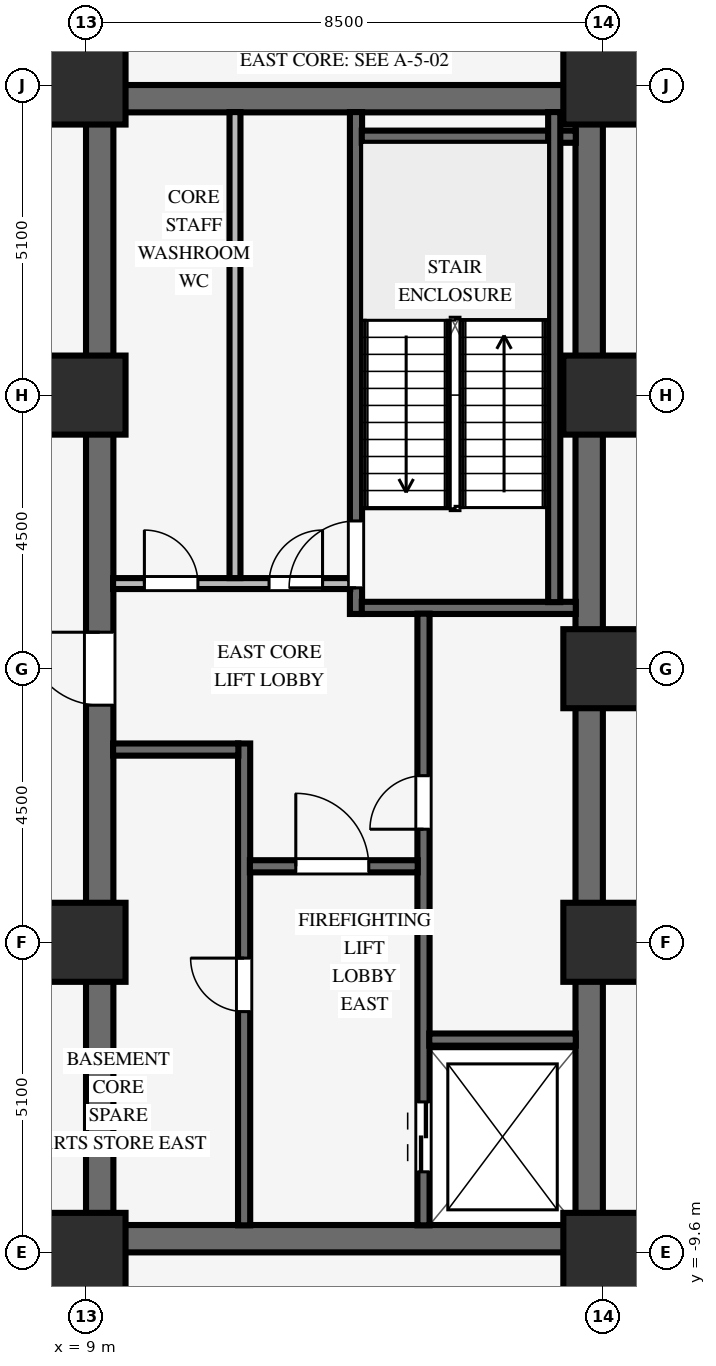
"""IFC4 building model, lengths in metres.
Left out: names, types, materials, properties, quantities, classifications, styles, units other than length and angle.
Written with IfcOpenShell. Run it as: python <this file> out.ifc"""

import sys

from ifc_helpers import new_model, si_unit, direction, frame, frame_2d, origin, origin_2d, place, context, subcontext, project, spatial, rectangle, extrude, source, transform, mapped, element, fill, save


model = new_model("IFC4")
c1 = context("Model", 3, precision=1e-05, world=origin(), true_north=direction((0.0, 1.0)))
c2 = subcontext(c1, "Body", "Model", "MODEL_VIEW")
j1 = project(units=[si_unit("LENGTHUNIT", "METRE"), si_unit("PLANEANGLEUNIT", "RADIAN")], contexts=[c1])
p1 = place(None, origin())
s1 = spatial("IfcSite", under=j1, at=p1, CompositionType="ELEMENT")
p2 = place(p1, origin())
s2 = spatial("IfcBuilding", under=s1, at=p2, CompositionType="ELEMENT")
p3 = place(p2, frame((0.0, 0.0, -4.2)))
s3 = spatial("IfcBuildingStorey", under=s2, at=p3, CompositionType="ELEMENT", Elevation=-4.2)
for number, where, z_axis, x_axis in (
    (1, (9.0, -9.375, 0.0), (0.0, 0.0, 1.0), (1.0, 0.0, 0.0)),
    (2, (9.0, 9.375, 0.0), (0.0, 0.0, 1.0), (1.0, 0.0, 0.0)),
):
    element("IfcWall", number, at=place(p3, frame(where, z_axis=z_axis, x_axis=x_axis)), inside=s3, PredefinedType="SHEAR", context=c2, shape_type="SweptSolid", body=[
        extrude(rectangle(XDim=8.5, YDim=0.45, at=frame_2d((4.25, 0.0))), origin(), (0.0, 0.0, 1.0), 3.88),
    ])
p4 = place(p3, frame((9.225, -9.155, 0.0), z_axis=(0.0, 0.0, 1.0), x_axis=(0.0, 1.0, 0.0)))
e3 = element("IfcWall", 3, at=p4, inside=s3, PredefinedType="SHEAR", context=c2, shape_type="SweptSolid", body=[
    extrude(rectangle(XDim=18.31, YDim=0.45, at=frame_2d((9.155, 0.0))), origin(), (0.0, 0.0, 1.0), 3.88),
])
p5 = place(p4, frame((8.555, 0.0, 0.0)))
e4 = element("IfcOpeningElement", 4, at=p5, cuts=e3, PredefinedType="OPENING", context=c2, shape_type="SweptSolid", body=[
    extrude(rectangle(XDim=1.2, YDim=2.15, at=frame_2d((0.6, 1.075))), frame((0.0, 0.235, 0.0), z_axis=(0.0, -1.0, 0.0), x_axis=(1.0, 0.0, 0.0)), (0.0, 0.0, 1.0), 0.47),
])
p6 = place(p3, frame((17.275, -9.155, 0.0), z_axis=(0.0, 0.0, 1.0), x_axis=(0.0, 1.0, 0.0)))
e5 = element("IfcWall", 5, at=p6, inside=s3, PredefinedType="SHEAR", context=c2, shape_type="SweptSolid", body=[
    extrude(rectangle(XDim=18.31, YDim=0.45, at=frame_2d((9.155, 0.0))), origin(), (0.0, 0.0, 1.0), 3.88),
])
for number, where, z_axis, x_axis in (
    (6, (9.0, -9.6, 0.0), (0.0, 0.0, 1.0), (1.0, 0.0, 0.0)),
    (7, (9.0, -4.5, 0.0), (0.0, 0.0, 1.0), (1.0, 0.0, 0.0)),
    (8, (9.0, 4.5, 0.0), (0.0, 0.0, 1.0), (1.0, 0.0, 0.0)),
    (9, (9.0, 9.6, 0.0), (0.0, 0.0, 1.0), (1.0, 0.0, 0.0)),
    (10, (17.5, -9.6, 0.0), (0.0, 0.0, 1.0), (1.0, 0.0, 0.0)),
    (11, (17.5, -4.5, 0.0), (0.0, 0.0, 1.0), (1.0, 0.0, 0.0)),
    (12, (17.5, 4.5, 0.0), (0.0, 0.0, 1.0), (1.0, 0.0, 0.0)),
    (13, (17.5, 9.6, 0.0), (0.0, 0.0, 1.0), (1.0, 0.0, 0.0)),
    (14, (17.5, 0.0, 0.0), (0.0, 0.0, 1.0), (1.0, 0.0, 0.0)),
):
    element("IfcColumn", number, at=place(p3, frame(where, z_axis=z_axis, x_axis=x_axis)), inside=s3, PredefinedType="COLUMN", context=c2, shape_type="SweptSolid", body=[
        extrude(rectangle(XDim=1.3, YDim=1.3, at=origin_2d()), origin(), (0.0, 0.0, 1.0), 3.88),
    ])
p7 = place(p3, frame((13.44, 0.9, 0.0), z_axis=(0.0, 0.0, 1.0), x_axis=(0.0, 1.0, 0.0)))
e15 = element("IfcWall", 15, at=p7, inside=s3, PredefinedType="SHEAR", context=c2, shape_type="SweptSolid", body=[
    extrude(rectangle(XDim=8.255, YDim=0.2, at=frame_2d((4.127, 0.0))), origin(), (0.0, 0.0, 1.0), 3.88),
])
p8 = place(p7, frame((0.43, 0.0, 0.0)))
e16 = element("IfcOpeningElement", 16, at=p8, cuts=e15, PredefinedType="OPENING", context=c2, shape_type="SweptSolid", body=[
    extrude(rectangle(XDim=1.1, YDim=2.15, at=frame_2d((0.55, 1.075))), frame((0.0, 0.11, 0.0), z_axis=(0.0, -1.0, 0.0), x_axis=(1.0, 0.0, 0.0)), (0.0, 0.0, 1.0), 0.22),
])
for number, where, z_axis, x_axis in (
    (17, (13.535, 1.0, 0.0), (0.0, 0.0, 1.0), (1.0, 0.0, 0.0)),
    (18, (13.535, 8.75, 0.0), (0.0, 0.0, 1.0), (1.0, 0.0, 0.0)),
):
    element("IfcWall", number, at=place(p3, frame(where, z_axis=z_axis, x_axis=x_axis)), inside=s3, PredefinedType="SHEAR", context=c2, shape_type="SweptSolid", body=[
        extrude(rectangle(XDim=3.52, YDim=0.2, at=frame_2d((1.76, 0.0))), origin(), (0.0, 0.0, 1.0), 3.88),
    ])
p9 = place(p3, frame((16.7, 1.095, 0.0), z_axis=(0.0, 0.0, 1.0), x_axis=(0.0, 1.0, 0.0)))
e19 = element("IfcWall", 19, at=p9, inside=s3, PredefinedType="SHEAR", context=c2, shape_type="SweptSolid", body=[
    extrude(rectangle(XDim=8.06, YDim=0.2, at=frame_2d((4.03, 0.0))), origin(), (0.0, 0.0, 1.0), 3.88),
])
p10 = place(p3, frame((14.55, -9.155, 0.0), z_axis=(0.0, 0.0, 1.0), x_axis=(0.0, 1.0, 0.0)))
e20 = element("IfcWall", 20, at=p10, inside=s3, PredefinedType="SHEAR", context=c2, shape_type="SweptSolid", body=[
    extrude(rectangle(XDim=10.06, YDim=0.2, at=frame_2d((5.03, 0.0))), origin(), (0.0, 0.0, 1.0), 3.88),
])
p11 = place(p10, frame((6.515, 0.0, 0.0)))
e21 = element("IfcOpeningElement", 21, at=p11, cuts=e20, PredefinedType="OPENING", context=c2, shape_type="SweptSolid", body=[
    extrude(rectangle(XDim=0.88, YDim=2.1, at=frame_2d((0.44, 1.05))), frame((0.0, 0.11, 0.0), z_axis=(0.0, -1.0, 0.0), x_axis=(1.0, 0.0, 0.0)), (0.0, 0.0, 1.0), 0.22),
])
p12 = place(p10, frame((0.88, 0.0, 0.0)))
e22 = element("IfcOpeningElement", 22, at=p12, cuts=e20, PredefinedType="OPENING", context=c2, shape_type="SweptSolid", body=[
    extrude(rectangle(XDim=1.15, YDim=2.15, at=frame_2d((0.575, 1.075))), frame((0.0, 0.11, 0.0), z_axis=(0.0, -1.0, 0.0), x_axis=(1.0, 0.0, 0.0)), (0.0, 0.0, 1.0), 0.22),
])
p13 = place(p3, frame((14.645, -6.1, 0.0), z_axis=(0.0, 0.0, 1.0), x_axis=(1.0, 0.0, 0.0)))
e23 = element("IfcWall", 23, at=p13, inside=s3, PredefinedType="SHEAR", context=c2, shape_type="SweptSolid", body=[
    extrude(rectangle(XDim=2.41, YDim=0.2, at=frame_2d((1.205, 0.0))), origin(), (0.0, 0.0, 1.0), 3.88),
])
p14 = place(p3, frame((11.6, -9.155, 0.0), z_axis=(0.0, 0.0, 1.0), x_axis=(0.0, 1.0, 0.0)))
e24 = element("IfcWall", 24, at=p14, inside=s3, PredefinedType="SHEAR", context=c2, shape_type="SweptSolid", body=[
    extrude(rectangle(XDim=7.925, YDim=0.2, at=frame_2d((3.962, 0.0))), origin(), (0.0, 0.0, 1.0), 3.88),
])
p15 = place(p14, frame((3.515, 0.0, 0.0)))
e25 = element("IfcOpeningElement", 25, at=p15, cuts=e24, PredefinedType="OPENING", context=c2, shape_type="SweptSolid", body=[
    extrude(rectangle(XDim=0.88, YDim=2.1, at=frame_2d((0.44, 1.05))), frame((0.0, 0.11, 0.0), z_axis=(0.0, -1.0, 0.0), x_axis=(1.0, 0.0, 0.0)), (0.0, 0.0, 1.0), 0.22),
])
p16 = place(p3, frame((11.695, -3.25, 0.0), z_axis=(0.0, 0.0, 1.0), x_axis=(1.0, 0.0, 0.0)))
e26 = element("IfcWall", 26, at=p16, inside=s3, PredefinedType="SHEAR", context=c2, shape_type="SweptSolid", body=[
    extrude(rectangle(XDim=2.76, YDim=0.2, at=frame_2d((1.38, 0.0))), origin(), (0.0, 0.0, 1.0), 3.88),
])
p17 = place(p16, frame((0.755, 0.0, 0.0)))
e27 = element("IfcOpeningElement", 27, at=p17, cuts=e26, PredefinedType="OPENING", context=c2, shape_type="SweptSolid", body=[
    extrude(rectangle(XDim=1.2, YDim=2.15, at=frame_2d((0.6, 1.075))), frame((0.0, 0.11, 0.0), z_axis=(0.0, -1.0, 0.0), x_axis=(1.0, 0.0, 0.0)), (0.0, 0.0, 1.0), 0.22),
])
p18 = place(p3, frame((9.445, -1.33, 0.0), z_axis=(0.0, 0.0, 1.0), x_axis=(1.0, 0.0, 0.0)))
e28 = element("IfcWall", 28, at=p18, inside=s3, PredefinedType="SHEAR", context=c2, shape_type="SweptSolid", body=[
    extrude(rectangle(XDim=2.06, YDim=0.2, at=frame_2d((1.03, 0.0))), origin(), (0.0, 0.0, 1.0), 3.88),
])
p19 = place(p3, frame((9.445, 1.4, 0.0), z_axis=(0.0, 0.0, 1.0), x_axis=(1.0, 0.0, 0.0)))
e29 = element("IfcWall", 29, at=p19, inside=s3, PredefinedType="PARTITIONING", context=c2, shape_type="SweptSolid", body=[
    extrude(rectangle(XDim=3.9, YDim=0.18, at=frame_2d((1.95, 0.0))), origin(), (0.0, 0.0, 1.0), 3.87),
])
p20 = place(p19, frame((0.515, 0.0, 0.0)))
e30 = element("IfcOpeningElement", 30, at=p20, cuts=e29, PredefinedType="OPENING", context=c2, shape_type="SweptSolid", body=[
    extrude(rectangle(XDim=0.88, YDim=2.1, at=frame_2d((0.44, 1.05))), frame((0.0, 0.1, 0.0), z_axis=(0.0, -1.0, 0.0), x_axis=(1.0, 0.0, 0.0)), (0.0, 0.0, 1.0), 0.2),
])
p21 = place(p19, frame((2.565, 0.0, 0.0)))
e31 = element("IfcOpeningElement", 31, at=p21, cuts=e29, PredefinedType="OPENING", context=c2, shape_type="SweptSolid", body=[
    extrude(rectangle(XDim=0.88, YDim=2.1, at=frame_2d((0.44, 1.05))), frame((0.0, 0.1, 0.0), z_axis=(0.0, -1.0, 0.0), x_axis=(1.0, 0.0, 0.0)), (0.0, 0.0, 1.0), 0.2),
])
p22 = place(p3, frame((11.45, 1.49, 0.0), z_axis=(0.0, 0.0, 1.0), x_axis=(0.0, 1.0, 0.0)))
e32 = element("IfcWall", 32, at=p22, inside=s3, PredefinedType="PARTITIONING", context=c2, shape_type="SweptSolid", body=[
    extrude(rectangle(XDim=7.665, YDim=0.18, at=frame_2d((3.833, 0.0))), origin(), (0.0, 0.0, 1.0), 3.87),
])
m1 = source(origin(), c2, "Body", "SweptSolid", [
    extrude(rectangle(XDim=1.1, YDim=2.15, at=frame_2d((0.55, 1.075))), frame((0.0, 0.025, 0.0), z_axis=(0.0, -1.0, 0.0), x_axis=(1.0, 0.0, 0.0)), (0.0, 0.0, 1.0), 0.05),
])
p23 = place(p8, origin())
e33 = element("IfcDoor", 33, at=p23, inside=s3, OperationType="SINGLE_SWING_LEFT", PredefinedType="DOOR", context=c2, shape_type="MappedRepresentation", body=[
    mapped(m1, transform((0.0, 0.0, 0.0), scale=1.0)),
])
fill(e16, e33)
m2 = source(origin(), c2, "Body", "SweptSolid", [
    extrude(rectangle(XDim=0.88, YDim=2.1, at=frame_2d((0.44, 1.05))), frame((0.0, 0.025, 0.0), z_axis=(0.0, -1.0, 0.0), x_axis=(1.0, 0.0, 0.0)), (0.0, 0.0, 1.0), 0.05),
])
p24 = place(p11, origin())
e34 = element("IfcDoor", 34, at=p24, inside=s3, OperationType="SINGLE_SWING_LEFT", PredefinedType="DOOR", context=c2, shape_type="MappedRepresentation", body=[
    mapped(m2, transform((0.0, 0.0, 0.0), scale=1.0)),
])
fill(e21, e34)
m3 = source(origin(), c2, "Body", "SweptSolid", [
    extrude(rectangle(XDim=1.2, YDim=2.15, at=frame_2d((0.6, 1.075))), frame((0.0, 0.025, 0.0), z_axis=(0.0, -1.0, 0.0), x_axis=(1.0, 0.0, 0.0)), (0.0, 0.0, 1.0), 0.05),
])
p25 = place(p17, origin())
e35 = element("IfcDoor", 35, at=p25, inside=s3, OperationType="SINGLE_SWING_LEFT", PredefinedType="DOOR", context=c2, shape_type="MappedRepresentation", body=[
    mapped(m3, transform((0.0, 0.0, 0.0), scale=1.0)),
])
fill(e27, e35)
p26 = place(p15, origin())
e36 = element("IfcDoor", 36, at=p26, inside=s3, OperationType="SINGLE_SWING_RIGHT", PredefinedType="DOOR", context=c2, shape_type="MappedRepresentation", body=[
    mapped(m2, transform((0.0, 0.0, 0.0), scale=1.0)),
])
fill(e25, e36)
p27 = place(p5, origin())
e37 = element("IfcDoor", 37, at=p27, inside=s3, OperationType="SINGLE_SWING_RIGHT", PredefinedType="DOOR", context=c2, shape_type="MappedRepresentation", body=[
    mapped(m3, transform((0.0, 0.0, 0.0), scale=1.0)),
])
fill(e4, e37)
p28 = place(p20, origin())
e38 = element("IfcDoor", 38, at=p28, inside=s3, OperationType="SINGLE_SWING_LEFT", PredefinedType="DOOR", context=c2, shape_type="MappedRepresentation", body=[
    mapped(m2, transform((0.0, 0.0, 0.0), scale=1.0)),
])
fill(e30, e38)
p29 = place(p21, origin())
e39 = element("IfcDoor", 39, at=p29, inside=s3, OperationType="SINGLE_SWING_RIGHT", PredefinedType="DOOR", context=c2, shape_type="MappedRepresentation", body=[
    mapped(m2, transform((0.0, 0.0, 0.0), scale=1.0)),
])
fill(e31, e39)
m4 = source(origin(), c2, "Body", "SweptSolid", [
    extrude(rectangle(XDim=1.15, YDim=2.15, at=frame_2d((0.575, 1.075))), frame((0.0, 0.025, 0.0), z_axis=(0.0, -1.0, 0.0), x_axis=(1.0, 0.0, 0.0)), (0.0, 0.0, 1.0), 0.05),
])
p30 = place(p12, origin())
e40 = element("IfcDoor", 40, at=p30, inside=s3, OperationType="DOUBLE_DOOR_SLIDING", PredefinedType="DOOR", context=c2, shape_type="MappedRepresentation", body=[
    mapped(m4, transform((0.0, 0.0, 0.0), scale=1.0)),
])
fill(e22, e40)
save(model, sys.argv[1])
